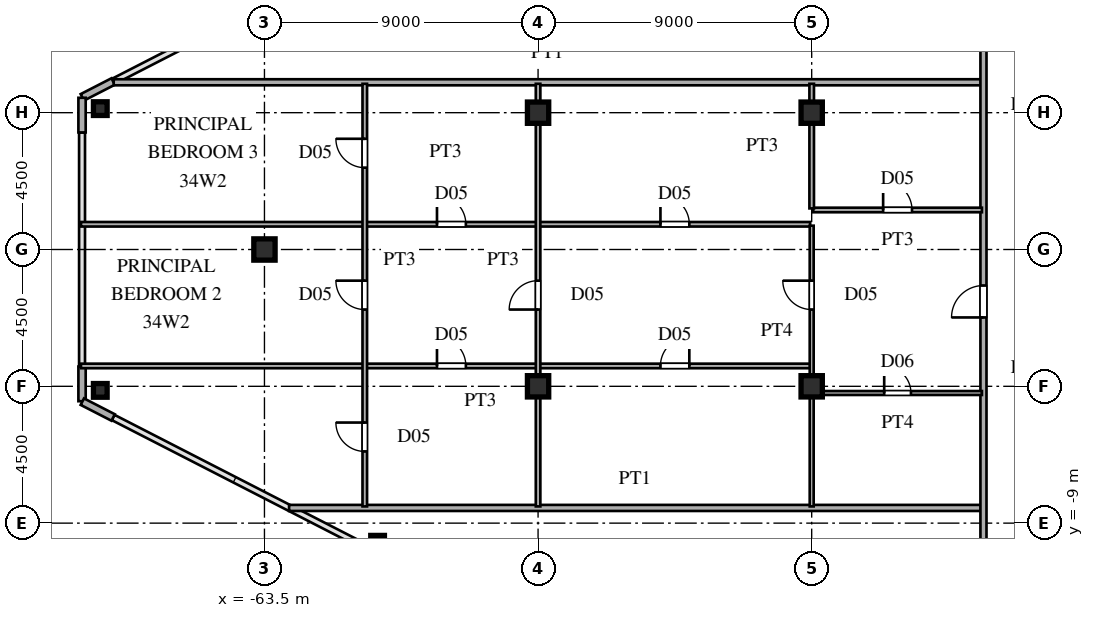
"""IFC4 building model, lengths in metres.
Left out: names, types, materials, properties, quantities, classifications, styles, units other than length and angle.
Written with IfcOpenShell. Run it as: python <this file> out.ifc"""

import sys

from ifc_helpers import new_model, si_unit, direction, frame, frame_2d, origin, origin_2d, place, context, subcontext, project, spatial, rectangle, hollow_rectangle, i_section, extrude, source, transform, mapped, element, fill, save


model = new_model("IFC4")
c1 = context("Model", 3, precision=1e-05, world=origin(), true_north=direction((0.0, 1.0)))
c2 = subcontext(c1, "Body", "Model", "MODEL_VIEW")
j1 = project(units=[si_unit("LENGTHUNIT", "METRE"), si_unit("PLANEANGLEUNIT", "RADIAN")], contexts=[c1])
p1 = place(None, origin())
s1 = spatial("IfcSite", under=j1, at=p1, CompositionType="ELEMENT")
p2 = place(p1, origin())
s2 = spatial("IfcBuilding", under=s1, at=p2, CompositionType="ELEMENT")
p3 = place(p2, frame((0.0, 0.0, 128.4)))
s3 = spatial("IfcBuildingStorey", under=s2, at=p3, CompositionType="ELEMENT", Elevation=128.4)
m1 = source(origin(), c2, "Body", "SweptSolid", [
    extrude(i_section(OverallWidth=0.7, OverallDepth=0.7, WebThickness=0.028, FlangeThickness=0.045, at=origin_2d()), origin(), (0.0, 0.0, 1.0), 3.6),
])
for number, where, z_axis, x_axis in (
    (1, (-45.5, -4.5, 0.0), (0.0, 0.0, 1.0), (1.0, 0.0, 0.0)),
    (2, (-45.5, 4.5, 0.0), (0.0, 0.0, 1.0), (1.0, 0.0, 0.0)),
    (3, (-54.5, -4.5, 0.0), (0.0, 0.0, 1.0), (1.0, 0.0, 0.0)),
    (4, (-54.5, 4.5, 0.0), (0.0, 0.0, 1.0), (1.0, 0.0, 0.0)),
    (5, (-63.5, 0.0, 0.0), (0.0, 0.0, 1.0), (1.0, 0.0, 0.0)),
):
    element("IfcColumn", number, at=place(p3, frame(where, z_axis=z_axis, x_axis=x_axis)), inside=s3, PredefinedType="COLUMN", context=c2, shape_type="MappedRepresentation", body=[
        mapped(m1, transform((0.0, 0.0, 0.0), scale=1.0)),
    ])
m2 = source(origin(), c2, "Body", "SweptSolid", [
    extrude(hollow_rectangle(XDim=0.45, YDim=0.45, WallThickness=0.018, at=origin_2d()), origin(), (0.0, 0.0, 1.0), 3.6),
])
for number, where, z_axis, x_axis in (
    (6, (-68.9, 4.634, 0.0), (0.0, 0.0, 1.0), (1.0, 0.0, 0.0)),
    (7, (-68.9, -4.634, 0.0), (0.0, 0.0, 1.0), (1.0, 0.0, 0.0)),
    (8, (-59.779, -9.629, 0.0), (0.0, 0.0, 1.0), (1.0, 0.0, 0.0)),
):
    element("IfcColumn", number, at=place(p3, frame(where, z_axis=z_axis, x_axis=x_axis)), inside=s3, PredefinedType="COLUMN", context=c2, shape_type="MappedRepresentation", body=[
        mapped(m2, transform((0.0, 0.0, 0.0), scale=1.0)),
    ])
p4 = place(p3, frame((-68.477, 5.525, 0.0), z_axis=(0.0, 0.0, 1.0), x_axis=(-0.889797395748, -0.456355776255, 0.0)))
e9 = element("IfcWall", 9, at=p4, inside=s3, PredefinedType="SOLIDWALL", context=c2, shape_type="SweptSolid", body=[
    extrude(rectangle(XDim=1.14, YDim=0.24, at=frame_2d((0.57, 0.0))), origin(), (0.0, 0.0, 1.0), 3.38),
])
for number, where, z_axis, x_axis in (
    (10, (-69.5, 4.99, 0.0), (0.0, 0.0, 1.0), (0.0, -1.0, 0.0)),
    (11, (-69.5, -3.85, 0.0), (0.0, 0.0, 1.0), (0.0, -1.0, 0.0)),
):
    element("IfcWall", number, at=place(p3, frame(where, z_axis=z_axis, x_axis=x_axis)), inside=s3, PredefinedType="SOLIDWALL", context=c2, shape_type="SweptSolid", body=[
        extrude(rectangle(XDim=1.14, YDim=0.24, at=frame_2d((0.57, 0.0))), origin(), (0.0, 0.0, 1.0), 3.38),
    ])
p5 = place(p3, frame((-69.491, -5.005, 0.0), z_axis=(0.0, 0.0, 1.0), x_axis=(0.889797395748, -0.456355776255, 0.0)))
e12 = element("IfcWall", 12, at=p5, inside=s3, PredefinedType="SOLIDWALL", context=c2, shape_type="SweptSolid", body=[
    extrude(rectangle(XDim=1.14, YDim=0.24, at=frame_2d((0.57, 0.0))), origin(), (0.0, 0.0, 1.0), 3.38),
])
p6 = place(p3, frame((-62.69, -8.5, 0.0), z_axis=(0.0, 0.0, 1.0), x_axis=(1.0, 0.0, 0.0)))
e13 = element("IfcWall", 13, at=p6, inside=s3, PredefinedType="PARTITIONING", context=c2, shape_type="SweptSolid", body=[
    extrude(rectangle(XDim=22.76, YDim=0.2, at=frame_2d((11.38, 0.0))), origin(), (0.0, 0.0, 1.0), 3.38),
])
p7 = place(p3, frame((-45.45, -4.72, 0.0), z_axis=(0.0, 0.0, 1.0), x_axis=(1.0, 0.0, 0.0)))
e14 = element("IfcWall", 14, at=p7, inside=s3, PredefinedType="PARTITIONING", context=c2, shape_type="SweptSolid", body=[
    extrude(rectangle(XDim=5.55, YDim=0.13, at=frame_2d((2.775, 0.0))), origin(), (0.0, 0.0, 1.0), 3.38),
])
p8 = place(p7, frame((2.335, 0.0, 0.0)))
e15 = element("IfcOpeningElement", 15, at=p8, cuts=e14, PredefinedType="OPENING", context=c2, shape_type="SweptSolid", body=[
    extrude(rectangle(XDim=0.88, YDim=2.1, at=frame_2d((0.44, 1.05))), frame((0.0, 0.075, 0.0), z_axis=(0.0, -1.0, 0.0), x_axis=(1.0, 0.0, 0.0)), (0.0, 0.0, 1.0), 0.15),
])
p9 = place(p3, frame((-69.535, -3.83, 0.0), z_axis=(0.0, 0.0, 1.0), x_axis=(1.0, 0.0, 0.0)))
e16 = element("IfcWall", 16, at=p9, inside=s3, PredefinedType="PARTITIONING", context=c2, shape_type="SweptSolid", body=[
    extrude(rectangle(XDim=23.985, YDim=0.15, at=frame_2d((11.992, 0.0))), origin(), (0.0, 0.0, 1.0), 3.38),
])
p10 = place(p9, frame((19.06, 0.0, 0.0)))
e17 = element("IfcOpeningElement", 17, at=p10, cuts=e16, PredefinedType="OPENING", context=c2, shape_type="SweptSolid", body=[
    extrude(rectangle(XDim=0.95, YDim=2.15, at=frame_2d((0.475, 1.075))), frame((0.0, 0.085, 0.0), z_axis=(0.0, -1.0, 0.0), x_axis=(1.0, 0.0, 0.0)), (0.0, 0.0, 1.0), 0.17),
])
p11 = place(p9, frame((11.71, 0.0, 0.0)))
e18 = element("IfcOpeningElement", 18, at=p11, cuts=e16, PredefinedType="OPENING", context=c2, shape_type="SweptSolid", body=[
    extrude(rectangle(XDim=0.95, YDim=2.15, at=frame_2d((0.475, 1.075))), frame((0.0, 0.085, 0.0), z_axis=(0.0, -1.0, 0.0), x_axis=(1.0, 0.0, 0.0)), (0.0, 0.0, 1.0), 0.17),
])
p12 = place(p3, frame((-69.535, 0.83, 0.0), z_axis=(0.0, 0.0, 1.0), x_axis=(1.0, 0.0, 0.0)))
e19 = element("IfcWall", 19, at=p12, inside=s3, PredefinedType="PARTITIONING", context=c2, shape_type="SweptSolid", body=[
    extrude(rectangle(XDim=23.985, YDim=0.15, at=frame_2d((11.992, 0.0))), origin(), (0.0, 0.0, 1.0), 3.38),
])
p13 = place(p12, frame((19.06, 0.0, 0.0)))
e20 = element("IfcOpeningElement", 20, at=p13, cuts=e19, PredefinedType="OPENING", context=c2, shape_type="SweptSolid", body=[
    extrude(rectangle(XDim=0.95, YDim=2.15, at=frame_2d((0.475, 1.075))), frame((0.0, 0.085, 0.0), z_axis=(0.0, -1.0, 0.0), x_axis=(1.0, 0.0, 0.0)), (0.0, 0.0, 1.0), 0.17),
])
p14 = place(p12, frame((11.71, 0.0, 0.0)))
e21 = element("IfcOpeningElement", 21, at=p14, cuts=e19, PredefinedType="OPENING", context=c2, shape_type="SweptSolid", body=[
    extrude(rectangle(XDim=0.95, YDim=2.15, at=frame_2d((0.475, 1.075))), frame((0.0, 0.085, 0.0), z_axis=(0.0, -1.0, 0.0), x_axis=(1.0, 0.0, 0.0)), (0.0, 0.0, 1.0), 0.17),
])
p15 = place(p3, frame((-45.45, 1.3, 0.0), z_axis=(0.0, 0.0, 1.0), x_axis=(1.0, 0.0, 0.0)))
e22 = element("IfcWall", 22, at=p15, inside=s3, PredefinedType="PARTITIONING", context=c2, shape_type="SweptSolid", body=[
    extrude(rectangle(XDim=5.55, YDim=0.15, at=frame_2d((2.775, 0.0))), origin(), (0.0, 0.0, 1.0), 3.38),
])
p16 = place(p15, frame((2.3, 0.0, 0.0)))
e23 = element("IfcOpeningElement", 23, at=p16, cuts=e22, PredefinedType="OPENING", context=c2, shape_type="SweptSolid", body=[
    extrude(rectangle(XDim=0.95, YDim=2.15, at=frame_2d((0.475, 1.075))), frame((0.0, 0.085, 0.0), z_axis=(0.0, -1.0, 0.0), x_axis=(1.0, 0.0, 0.0)), (0.0, 0.0, 1.0), 0.17),
])
p17 = place(p3, frame((-68.458, 5.5, 0.0), z_axis=(0.0, 0.0, 1.0), x_axis=(1.0, 0.0, 0.0)))
e24 = element("IfcWall", 24, at=p17, inside=s3, PredefinedType="PARTITIONING", context=c2, shape_type="SweptSolid", body=[
    extrude(rectangle(XDim=28.529, YDim=0.2, at=frame_2d((14.264, 0.0))), origin(), (0.0, 0.0, 1.0), 3.38),
])
p18 = place(p3, frame((-60.2, -8.45, 0.0), z_axis=(0.0, 0.0, 1.0), x_axis=(0.0, 1.0, 0.0)))
e25 = element("IfcWall", 25, at=p18, inside=s3, PredefinedType="PARTITIONING", context=c2, shape_type="SweptSolid", body=[
    extrude(rectangle(XDim=13.9, YDim=0.15, at=frame_2d((6.95, 0.0))), origin(), (0.0, 0.0, 1.0), 3.38),
])
p19 = place(p18, frame((1.808, 0.0, 0.0)))
e26 = element("IfcOpeningElement", 26, at=p19, cuts=e25, PredefinedType="OPENING", context=c2, shape_type="SweptSolid", body=[
    extrude(rectangle(XDim=0.95, YDim=2.15, at=frame_2d((0.475, 1.075))), frame((0.0, 0.085, 0.0), z_axis=(0.0, -1.0, 0.0), x_axis=(1.0, 0.0, 0.0)), (0.0, 0.0, 1.0), 0.17),
])
p20 = place(p18, frame((6.475, 0.0, 0.0)))
e27 = element("IfcOpeningElement", 27, at=p20, cuts=e25, PredefinedType="OPENING", context=c2, shape_type="SweptSolid", body=[
    extrude(rectangle(XDim=0.95, YDim=2.15, at=frame_2d((0.475, 1.075))), frame((0.0, 0.085, 0.0), z_axis=(0.0, -1.0, 0.0), x_axis=(1.0, 0.0, 0.0)), (0.0, 0.0, 1.0), 0.17),
])
p21 = place(p18, frame((11.142, 0.0, 0.0)))
e28 = element("IfcOpeningElement", 28, at=p21, cuts=e25, PredefinedType="OPENING", context=c2, shape_type="SweptSolid", body=[
    extrude(rectangle(XDim=0.95, YDim=2.15, at=frame_2d((0.475, 1.075))), frame((0.0, 0.085, 0.0), z_axis=(0.0, -1.0, 0.0), x_axis=(1.0, 0.0, 0.0)), (0.0, 0.0, 1.0), 0.17),
])
p22 = place(p3, frame((-54.5, -8.45, 0.0), z_axis=(0.0, 0.0, 1.0), x_axis=(0.0, 1.0, 0.0)))
e29 = element("IfcWall", 29, at=p22, inside=s3, PredefinedType="PARTITIONING", context=c2, shape_type="SweptSolid", body=[
    extrude(rectangle(XDim=13.9, YDim=0.15, at=frame_2d((6.95, 0.0))), origin(), (0.0, 0.0, 1.0), 2.78),
])
p23 = place(p22, frame((6.475, 0.0, 0.0)))
e30 = element("IfcOpeningElement", 30, at=p23, cuts=e29, PredefinedType="OPENING", context=c2, shape_type="SweptSolid", body=[
    extrude(rectangle(XDim=0.95, YDim=2.15, at=frame_2d((0.475, 1.075))), frame((0.0, 0.085, 0.0), z_axis=(0.0, -1.0, 0.0), x_axis=(1.0, 0.0, 0.0)), (0.0, 0.0, 1.0), 0.17),
])
p24 = place(p3, frame((-45.5, -8.45, 0.0), z_axis=(0.0, 0.0, 1.0), x_axis=(0.0, 1.0, 0.0)))
e31 = element("IfcWall", 31, at=p24, inside=s3, PredefinedType="PARTITIONING", context=c2, shape_type="SweptSolid", body=[
    extrude(rectangle(XDim=9.233, YDim=0.13, at=frame_2d((4.616, 0.0))), origin(), (0.0, 0.0, 1.0), 2.78),
])
p25 = place(p24, frame((6.475, 0.0, 0.0)))
e32 = element("IfcOpeningElement", 32, at=p25, cuts=e31, PredefinedType="OPENING", context=c2, shape_type="SweptSolid", body=[
    extrude(rectangle(XDim=0.95, YDim=2.15, at=frame_2d((0.475, 1.075))), frame((0.0, 0.075, 0.0), z_axis=(0.0, -1.0, 0.0), x_axis=(1.0, 0.0, 0.0)), (0.0, 0.0, 1.0), 0.15),
])
p26 = place(p3, frame((-45.5, 1.352, 0.0), z_axis=(0.0, 0.0, 1.0), x_axis=(0.0, 1.0, 0.0)))
e33 = element("IfcWall", 33, at=p26, inside=s3, PredefinedType="PARTITIONING", context=c2, shape_type="SweptSolid", body=[
    extrude(rectangle(XDim=4.098, YDim=0.15, at=frame_2d((2.049, 0.0))), origin(), (0.0, 0.0, 1.0), 2.78),
])
p27 = place(p3, frame((-39.85, -15.515, 0.0), z_axis=(0.0, 0.0, 1.0), x_axis=(0.0, 1.0, 0.0)))
e34 = element("IfcWall", 34, at=p27, inside=s3, PredefinedType="PARTITIONING", context=c2, shape_type="SweptSolid", body=[
    extrude(rectangle(XDim=31.03, YDim=0.2, at=frame_2d((15.515, 0.0))), origin(), (0.0, 0.0, 1.0), 3.38),
])
p28 = place(p27, frame((2.94, 0.0, 0.0)))
e35 = element("IfcOpeningElement", 35, at=p28, cuts=e34, PredefinedType="OPENING", context=c2, shape_type="SweptSolid", body=[
    extrude(rectangle(XDim=1.05, YDim=2.25, at=frame_2d((0.525, 1.125))), frame((0.0, 0.11, 0.0), z_axis=(0.0, -1.0, 0.0), x_axis=(1.0, 0.0, 0.0)), (0.0, 0.0, 1.0), 0.22),
])
p29 = place(p27, frame((13.28, 0.0, 0.0)))
e36 = element("IfcOpeningElement", 36, at=p29, cuts=e34, PredefinedType="OPENING", context=c2, shape_type="SweptSolid", body=[
    extrude(rectangle(XDim=1.05, YDim=2.25, at=frame_2d((0.525, 1.125))), frame((0.0, 0.11, 0.0), z_axis=(0.0, -1.0, 0.0), x_axis=(1.0, 0.0, 0.0)), (0.0, 0.0, 1.0), 0.22),
])
p30 = place(p27, frame((25.54, 0.0, 0.0)))
e37 = element("IfcOpeningElement", 37, at=p30, cuts=e34, PredefinedType="OPENING", context=c2, shape_type="SweptSolid", body=[
    extrude(rectangle(XDim=1.05, YDim=2.25, at=frame_2d((0.525, 1.125))), frame((0.0, 0.11, 0.0), z_axis=(0.0, -1.0, 0.0), x_axis=(1.0, 0.0, 0.0)), (0.0, 0.0, 1.0), 0.22),
])
m3 = source(origin(), c2, "Body", "SweptSolid", [
    extrude(rectangle(XDim=0.88, YDim=2.1, at=frame_2d((0.44, 1.05))), frame((0.0, 0.025, 0.0), z_axis=(0.0, -1.0, 0.0), x_axis=(1.0, 0.0, 0.0)), (0.0, 0.0, 1.0), 0.05),
])
p31 = place(p8, origin())
e38 = element("IfcDoor", 38, at=p31, inside=s3, OperationType="SINGLE_SWING_LEFT", PredefinedType="DOOR", context=c2, shape_type="MappedRepresentation", body=[
    mapped(m3, transform((0.0, 0.0, 0.0), scale=1.0)),
])
fill(e15, e38)
m4 = source(origin(), c2, "Body", "SweptSolid", [
    extrude(rectangle(XDim=0.95, YDim=2.15, at=frame_2d((0.475, 1.075))), frame((0.0, 0.025, 0.0), z_axis=(0.0, -1.0, 0.0), x_axis=(1.0, 0.0, 0.0)), (0.0, 0.0, 1.0), 0.05),
])
p32 = place(p10, origin())
e39 = element("IfcDoor", 39, at=p32, inside=s3, OperationType="SINGLE_SWING_RIGHT", PredefinedType="DOOR", context=c2, shape_type="MappedRepresentation", body=[
    mapped(m4, transform((0.0, 0.0, 0.0), scale=1.0)),
])
fill(e17, e39)
p33 = place(p11, origin())
e40 = element("IfcDoor", 40, at=p33, inside=s3, OperationType="SINGLE_SWING_LEFT", PredefinedType="DOOR", context=c2, shape_type="MappedRepresentation", body=[
    mapped(m4, transform((0.0, 0.0, 0.0), scale=1.0)),
])
fill(e18, e40)
p34 = place(p13, origin())
e41 = element("IfcDoor", 41, at=p34, inside=s3, OperationType="SINGLE_SWING_LEFT", PredefinedType="DOOR", context=c2, shape_type="MappedRepresentation", body=[
    mapped(m4, transform((0.0, 0.0, 0.0), scale=1.0)),
])
fill(e20, e41)
p35 = place(p14, origin())
e42 = element("IfcDoor", 42, at=p35, inside=s3, OperationType="SINGLE_SWING_LEFT", PredefinedType="DOOR", context=c2, shape_type="MappedRepresentation", body=[
    mapped(m4, transform((0.0, 0.0, 0.0), scale=1.0)),
])
fill(e21, e42)
p36 = place(p16, origin())
e43 = element("IfcDoor", 43, at=p36, inside=s3, OperationType="SINGLE_SWING_LEFT", PredefinedType="DOOR", context=c2, shape_type="MappedRepresentation", body=[
    mapped(m4, transform((0.0, 0.0, 0.0), scale=1.0)),
])
fill(e23, e43)
p37 = place(p19, origin())
e44 = element("IfcDoor", 44, at=p37, inside=s3, OperationType="SINGLE_SWING_RIGHT", PredefinedType="DOOR", context=c2, shape_type="MappedRepresentation", body=[
    mapped(m4, transform((0.0, 0.0, 0.0), scale=1.0)),
])
fill(e26, e44)
p38 = place(p20, origin())
e45 = element("IfcDoor", 45, at=p38, inside=s3, OperationType="SINGLE_SWING_RIGHT", PredefinedType="DOOR", context=c2, shape_type="MappedRepresentation", body=[
    mapped(m4, transform((0.0, 0.0, 0.0), scale=1.0)),
])
fill(e27, e45)
p39 = place(p21, origin())
e46 = element("IfcDoor", 46, at=p39, inside=s3, OperationType="SINGLE_SWING_RIGHT", PredefinedType="DOOR", context=c2, shape_type="MappedRepresentation", body=[
    mapped(m4, transform((0.0, 0.0, 0.0), scale=1.0)),
])
fill(e28, e46)
p40 = place(p23, origin())
e47 = element("IfcDoor", 47, at=p40, inside=s3, OperationType="SINGLE_SWING_LEFT", PredefinedType="DOOR", context=c2, shape_type="MappedRepresentation", body=[
    mapped(m4, transform((0.0, 0.0, 0.0), scale=1.0)),
])
fill(e30, e47)
p41 = place(p25, origin())
e48 = element("IfcDoor", 48, at=p41, inside=s3, OperationType="SINGLE_SWING_RIGHT", PredefinedType="DOOR", context=c2, shape_type="MappedRepresentation", body=[
    mapped(m4, transform((0.0, 0.0, 0.0), scale=1.0)),
])
fill(e32, e48)
m5 = source(origin(), c2, "Body", "SweptSolid", [
    extrude(rectangle(XDim=1.05, YDim=2.25, at=frame_2d((0.525, 1.125))), frame((0.0, 0.025, 0.0), z_axis=(0.0, -1.0, 0.0), x_axis=(1.0, 0.0, 0.0)), (0.0, 0.0, 1.0), 0.05),
])
p42 = place(p29, origin())
e49 = element("IfcDoor", 49, at=p42, inside=s3, OperationType="SINGLE_SWING_LEFT", PredefinedType="DOOR", context=c2, shape_type="MappedRepresentation", body=[
    mapped(m5, transform((0.0, 0.0, 0.0), scale=1.0)),
])
fill(e36, e49)
save(model, sys.argv[1])
